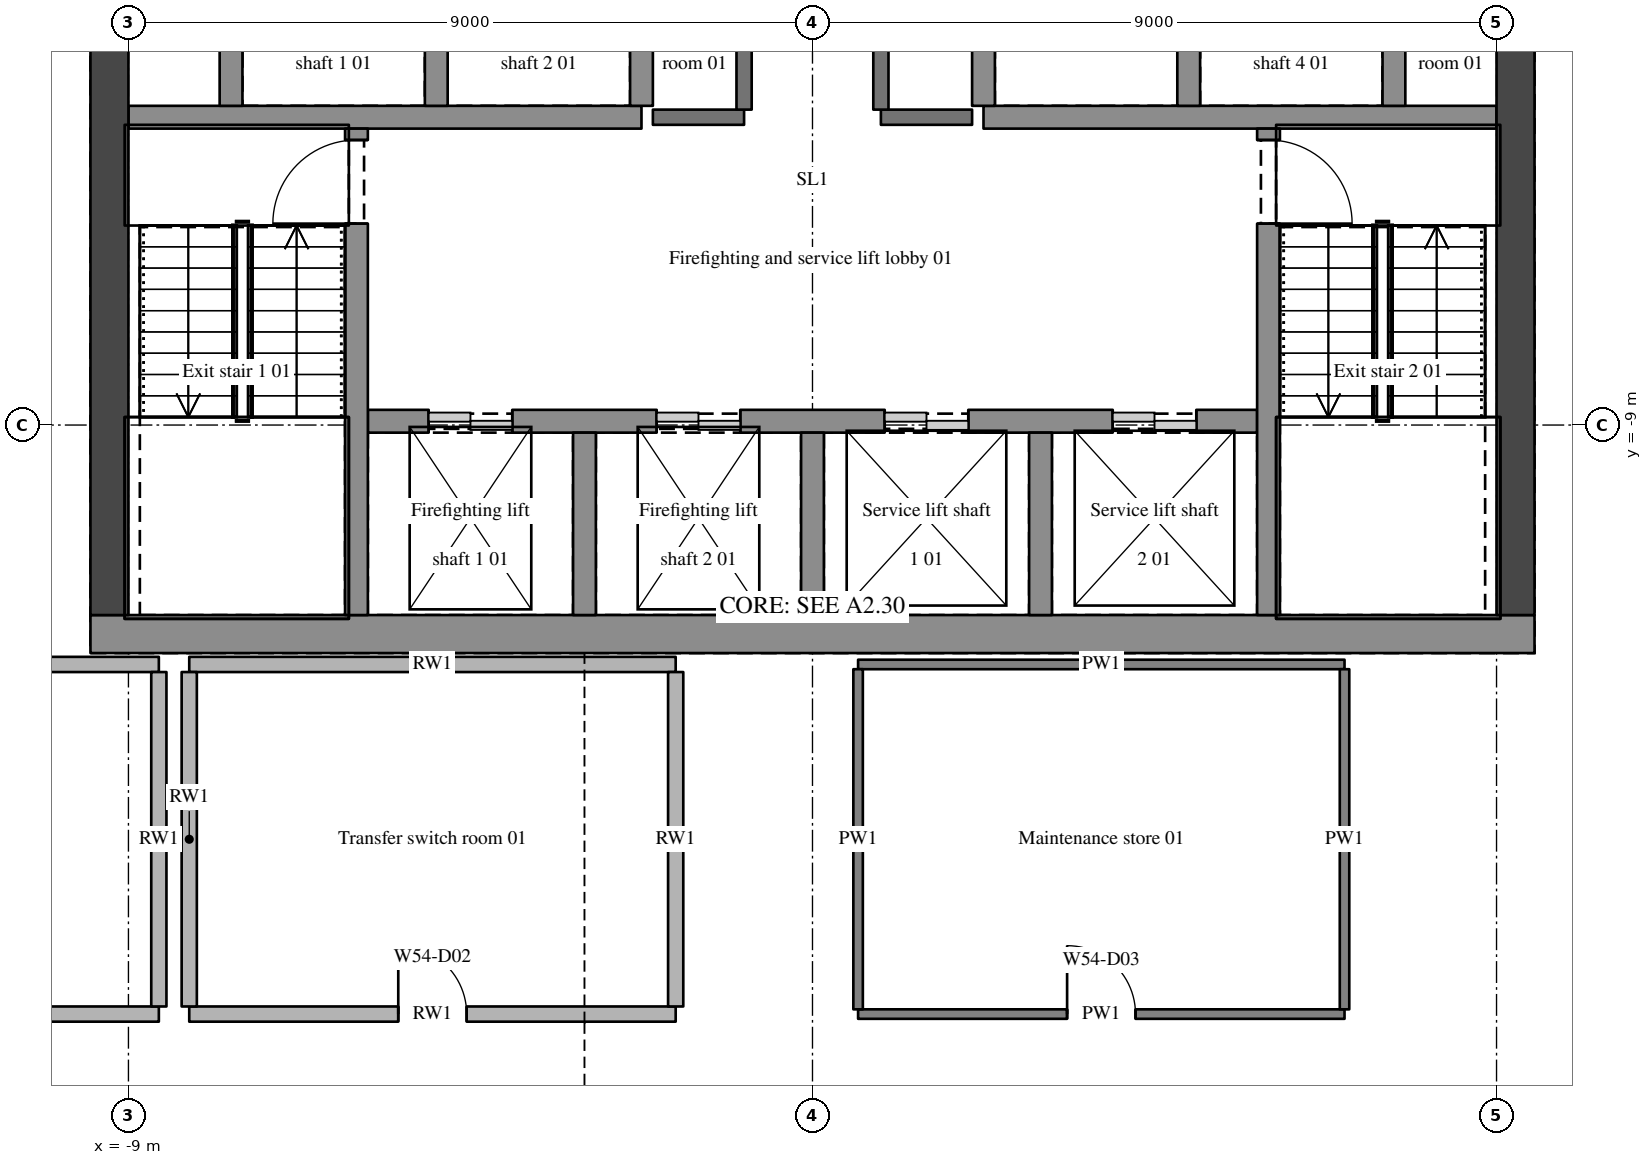
"""IFC4 building model, lengths in metres.
Left out: names, types, materials, properties, quantities, classifications, styles, units other than length and angle.
Written with IfcOpenShell. Run it as: python <this file> out.ifc"""

import sys

from ifc_helpers import new_model, si_unit, direction, frame, frame_2d, origin, place, context, subcontext, project, spatial, rectangle, extrude, element, fill, save


model = new_model("IFC4")
c1 = context("Model", 3, precision=1e-05, world=origin(), true_north=direction((0.0, 1.0)))
c2 = subcontext(c1, "Body", "Model", "MODEL_VIEW")
j1 = project(units=[si_unit("LENGTHUNIT", "METRE"), si_unit("PLANEANGLEUNIT", "RADIAN")], contexts=[c1])
p1 = place(None, origin())
s1 = spatial("IfcSite", under=j1, at=p1, CompositionType="ELEMENT")
p2 = place(p1, origin())
s2 = spatial("IfcBuilding", under=s1, at=p2, CompositionType="ELEMENT")
p3 = place(p2, frame((0.0, 0.0, 210.0)))
s3 = spatial("IfcBuildingStorey", under=s2, at=p3, CompositionType="ELEMENT", Elevation=210.0)
p4 = place(p3, frame((-9.5, -11.75, 0.0), z_axis=(0.0, 0.0, 1.0), x_axis=(1.0, 0.0, 0.0)))
e1 = element("IfcWall", 1, at=p4, inside=s3, PredefinedType="SHEAR", context=c2, shape_type="SweptSolid", body=[
    extrude(rectangle(XDim=19.0, YDim=0.5, at=frame_2d((9.5, 0.0))), origin(), (0.0, 0.0, 1.0), 7.2),
])
for number, where, z_axis, x_axis in (
    (2, (-9.25, -11.5, 0.0), (0.0, 0.0, 1.0), (0.0, 1.0, 0.0)),
    (3, (9.25, -11.5, 0.0), (0.0, 0.0, 1.0), (0.0, 1.0, 0.0)),
):
    element("IfcWall", number, at=place(p3, frame(where, z_axis=z_axis, x_axis=x_axis)), inside=s3, PredefinedType="SHEAR", context=c2, shape_type="SweptSolid", body=[
        extrude(rectangle(XDim=11.65, YDim=0.5, at=frame_2d((5.825, 0.0))), origin(), (0.0, 0.0, 1.0), 7.2),
    ])
p5 = place(p3, frame((-15.0, -16.75, 0.0), z_axis=(0.0, 0.0, 1.0), x_axis=(1.0, 0.0, 0.0)))
e4 = element("IfcWall", 4, at=p5, inside=s3, PredefinedType="SOLIDWALL", context=c2, shape_type="SweptSolid", body=[
    extrude(rectangle(XDim=6.4, YDim=0.2, at=frame_2d((3.2, 0.0))), origin(), (0.0, 0.0, 1.0), 5.5),
])
p6 = place(p5, frame((2.75, 0.0, 0.0)))
e5 = element("IfcOpeningElement", 5, at=p6, cuts=e4, PredefinedType="OPENING", context=c2, shape_type="SweptSolid", body=[
    extrude(rectangle(XDim=0.9, YDim=2.1, at=frame_2d((0.45, 1.05))), frame((0.0, 0.11, 0.0), z_axis=(0.0, -1.0, 0.0), x_axis=(1.0, 0.0, 0.0)), (0.0, 0.0, 1.0), 0.22),
])
p7 = place(p3, frame((-8.2, -16.75, 0.0), z_axis=(0.0, 0.0, 1.0), x_axis=(1.0, 0.0, 0.0)))
e6 = element("IfcWall", 6, at=p7, inside=s3, PredefinedType="SOLIDWALL", context=c2, shape_type="SweptSolid", body=[
    extrude(rectangle(XDim=6.4, YDim=0.2, at=frame_2d((3.2, 0.0))), origin(), (0.0, 0.0, 1.0), 5.5),
])
p8 = place(p7, frame((2.75, 0.0, 0.0)))
e7 = element("IfcOpeningElement", 7, at=p8, cuts=e6, PredefinedType="OPENING", context=c2, shape_type="SweptSolid", body=[
    extrude(rectangle(XDim=0.9, YDim=2.1, at=frame_2d((0.45, 1.05))), frame((0.0, 0.11, 0.0), z_axis=(0.0, -1.0, 0.0), x_axis=(1.0, 0.0, 0.0)), (0.0, 0.0, 1.0), 0.22),
])
p9 = place(p3, frame((0.6, -16.75, 0.0), z_axis=(0.0, 0.0, 1.0), x_axis=(1.0, 0.0, 0.0)))
e8 = element("IfcWall", 8, at=p9, inside=s3, PredefinedType="PARTITIONING", context=c2, shape_type="SweptSolid", body=[
    extrude(rectangle(XDim=6.4, YDim=0.125, at=frame_2d((3.2, 0.0))), origin(), (0.0, 0.0, 1.0), 5.5),
])
p10 = place(p9, frame((2.75, 0.0, 0.0)))
e9 = element("IfcOpeningElement", 9, at=p10, cuts=e8, PredefinedType="OPENING", context=c2, shape_type="SweptSolid", body=[
    extrude(rectangle(XDim=0.9, YDim=2.1, at=frame_2d((0.45, 1.05))), frame((0.0, 0.073, 0.0), z_axis=(0.0, -1.0, 0.0), x_axis=(1.0, 0.0, 0.0)), (0.0, 0.0, 1.0), 0.145),
])
for number, where, z_axis, x_axis in (
    (10, (-15.0, -12.15, 0.0), (0.0, 0.0, 1.0), (1.0, 0.0, 0.0)),
    (11, (-8.2, -12.15, 0.0), (0.0, 0.0, 1.0), (1.0, 0.0, 0.0)),
):
    element("IfcWall", number, at=place(p3, frame(where, z_axis=z_axis, x_axis=x_axis)), inside=s3, PredefinedType="SOLIDWALL", context=c2, shape_type="SweptSolid", body=[
        extrude(rectangle(XDim=6.4, YDim=0.2, at=frame_2d((3.2, 0.0))), origin(), (0.0, 0.0, 1.0), 5.5),
    ])
p11 = place(p3, frame((0.6, -12.15, 0.0), z_axis=(0.0, 0.0, 1.0), x_axis=(1.0, 0.0, 0.0)))
e12 = element("IfcWall", 12, at=p11, inside=s3, PredefinedType="PARTITIONING", context=c2, shape_type="SweptSolid", body=[
    extrude(rectangle(XDim=6.4, YDim=0.125, at=frame_2d((3.2, 0.0))), origin(), (0.0, 0.0, 1.0), 5.5),
])
p12 = place(p3, frame((-5.85, -8.95, 0.0), z_axis=(0.0, 0.0, 1.0), x_axis=(1.0, 0.0, 0.0)))
e13 = element("IfcWall", 13, at=p12, inside=s3, PredefinedType="SHEAR", context=c2, shape_type="SweptSolid", body=[
    extrude(rectangle(XDim=11.7, YDim=0.3, at=frame_2d((5.85, 0.0))), origin(), (0.0, 0.0, 1.0), 7.2),
])
p13 = place(p12, frame((0.8, 0.0, 0.0)))
e14 = element("IfcOpeningElement", 14, at=p13, cuts=e13, PredefinedType="OPENING", context=c2, shape_type="SweptSolid", body=[
    extrude(rectangle(XDim=1.1, YDim=2.1, at=frame_2d((0.55, 1.05))), frame((0.0, 0.16, 0.0), z_axis=(0.0, -1.0, 0.0), x_axis=(1.0, 0.0, 0.0)), (0.0, 0.0, 1.0), 0.32),
])
p14 = place(p12, frame((3.8, 0.0, 0.0)))
e15 = element("IfcOpeningElement", 15, at=p14, cuts=e13, PredefinedType="OPENING", context=c2, shape_type="SweptSolid", body=[
    extrude(rectangle(XDim=1.1, YDim=2.1, at=frame_2d((0.55, 1.05))), frame((0.0, 0.16, 0.0), z_axis=(0.0, -1.0, 0.0), x_axis=(1.0, 0.0, 0.0)), (0.0, 0.0, 1.0), 0.32),
])
p15 = place(p12, frame((6.8, 0.0, 0.0)))
e16 = element("IfcOpeningElement", 16, at=p15, cuts=e13, PredefinedType="OPENING", context=c2, shape_type="SweptSolid", body=[
    extrude(rectangle(XDim=1.1, YDim=2.1, at=frame_2d((0.55, 1.05))), frame((0.0, 0.16, 0.0), z_axis=(0.0, -1.0, 0.0), x_axis=(1.0, 0.0, 0.0)), (0.0, 0.0, 1.0), 0.32),
])
p16 = place(p12, frame((9.8, 0.0, 0.0)))
e17 = element("IfcOpeningElement", 17, at=p16, cuts=e13, PredefinedType="OPENING", context=c2, shape_type="SweptSolid", body=[
    extrude(rectangle(XDim=1.1, YDim=2.1, at=frame_2d((0.55, 1.05))), frame((0.0, 0.16, 0.0), z_axis=(0.0, -1.0, 0.0), x_axis=(1.0, 0.0, 0.0)), (0.0, 0.0, 1.0), 0.32),
])
p17 = place(p3, frame((-9.0, -4.95, 0.0), z_axis=(0.0, 0.0, 1.0), x_axis=(1.0, 0.0, 0.0)))
e18 = element("IfcWall", 18, at=p17, inside=s3, PredefinedType="SHEAR", context=c2, shape_type="SweptSolid", body=[
    extrude(rectangle(XDim=6.75, YDim=0.3, at=frame_2d((3.375, 0.0))), origin(), (0.0, 0.0, 1.0), 7.2),
])
for number, where, z_axis, x_axis in (
    (19, (-2.1, -4.95, 0.0), (0.0, 0.0, 1.0), (1.0, 0.0, 0.0)),
    (20, (0.9, -4.95, 0.0), (0.0, 0.0, 1.0), (1.0, 0.0, 0.0)),
):
    element("IfcWall", number, at=place(p3, frame(where, z_axis=z_axis, x_axis=x_axis)), inside=s3, PredefinedType="SOLIDWALL", context=c2, shape_type="SweptSolid", body=[
        extrude(rectangle(XDim=1.2, YDim=0.2, at=frame_2d((0.6, 0.0))), origin(), (0.0, 0.0, 1.0), 6.9),
    ])
p18 = place(p3, frame((2.25, -4.95, 0.0), z_axis=(0.0, 0.0, 1.0), x_axis=(1.0, 0.0, 0.0)))
e21 = element("IfcWall", 21, at=p18, inside=s3, PredefinedType="SHEAR", context=c2, shape_type="SweptSolid", body=[
    extrude(rectangle(XDim=6.75, YDim=0.3, at=frame_2d((3.375, 0.0))), origin(), (0.0, 0.0, 1.0), 7.2),
])
for number, where, z_axis, x_axis in (
    (22, (-8.6, -16.65, 0.0), (0.0, 0.0, 1.0), (0.0, 1.0, 0.0)),
    (23, (-8.2, -16.65, 0.0), (0.0, 0.0, 1.0), (0.0, 1.0, 0.0)),
):
    element("IfcWall", number, at=place(p3, frame(where, z_axis=z_axis, x_axis=x_axis)), inside=s3, PredefinedType="SOLIDWALL", context=c2, shape_type="SweptSolid", body=[
        extrude(rectangle(XDim=4.4, YDim=0.2, at=frame_2d((2.2, 0.0))), origin(), (0.0, 0.0, 1.0), 5.5),
    ])
p19 = place(p3, frame((-7.65, -4.8, 0.0), z_axis=(0.0, 0.0, 1.0), x_axis=(0.0, 1.0, 0.0)))
e24 = element("IfcWall", 24, at=p19, inside=s3, PredefinedType="SHEAR", context=c2, shape_type="SweptSolid", body=[
    extrude(rectangle(XDim=2.05, YDim=0.3, at=frame_2d((1.025, 0.0))), origin(), (0.0, 0.0, 1.0), 7.2),
])
p20 = place(p3, frame((-6.0, -11.5, 0.0), z_axis=(0.0, 0.0, 1.0), x_axis=(0.0, 1.0, 0.0)))
e25 = element("IfcWall", 25, at=p20, inside=s3, PredefinedType="SHEAR", context=c2, shape_type="SweptSolid", body=[
    extrude(rectangle(XDim=6.4, YDim=0.3, at=frame_2d((3.2, 0.0))), origin(), (0.0, 0.0, 1.0), 7.2),
])
p21 = place(p20, frame((5.15, 0.0, 0.0)))
e26 = element("IfcOpeningElement", 26, at=p21, cuts=e25, PredefinedType="OPENING", context=c2, shape_type="SweptSolid", body=[
    extrude(rectangle(XDim=1.1, YDim=2.1, at=frame_2d((0.55, 1.05))), frame((0.0, 0.16, 0.0), z_axis=(0.0, -1.0, 0.0), x_axis=(1.0, 0.0, 0.0)), (0.0, 0.0, 1.0), 0.32),
])
p22 = place(p3, frame((-4.95, -4.8, 0.0), z_axis=(0.0, 0.0, 1.0), x_axis=(0.0, 1.0, 0.0)))
e27 = element("IfcWall", 27, at=p22, inside=s3, PredefinedType="SHEAR", context=c2, shape_type="SweptSolid", body=[
    extrude(rectangle(XDim=2.05, YDim=0.3, at=frame_2d((1.025, 0.0))), origin(), (0.0, 0.0, 1.0), 7.2),
])
p23 = place(p3, frame((-3.0, -11.5, 0.0), z_axis=(0.0, 0.0, 1.0), x_axis=(0.0, 1.0, 0.0)))
e28 = element("IfcWall", 28, at=p23, inside=s3, PredefinedType="SHEAR", context=c2, shape_type="SweptSolid", body=[
    extrude(rectangle(XDim=2.4, YDim=0.3, at=frame_2d((1.2, 0.0))), origin(), (0.0, 0.0, 1.0), 7.2),
])
p24 = place(p3, frame((-2.25, -4.8, 0.0), z_axis=(0.0, 0.0, 1.0), x_axis=(0.0, 1.0, 0.0)))
e29 = element("IfcWall", 29, at=p24, inside=s3, PredefinedType="SHEAR", context=c2, shape_type="SweptSolid", body=[
    extrude(rectangle(XDim=2.05, YDim=0.3, at=frame_2d((1.025, 0.0))), origin(), (0.0, 0.0, 1.0), 7.2),
])
p25 = place(p3, frame((-1.8, -16.65, 0.0), z_axis=(0.0, 0.0, 1.0), x_axis=(0.0, 1.0, 0.0)))
e30 = element("IfcWall", 30, at=p25, inside=s3, PredefinedType="SOLIDWALL", context=c2, shape_type="SweptSolid", body=[
    extrude(rectangle(XDim=4.4, YDim=0.2, at=frame_2d((2.2, 0.0))), origin(), (0.0, 0.0, 1.0), 5.5),
])
p26 = place(p3, frame((-0.9, -4.85, 0.0), z_axis=(0.0, 0.0, 1.0), x_axis=(0.0, 1.0, 0.0)))
e31 = element("IfcWall", 31, at=p26, inside=s3, PredefinedType="SOLIDWALL", context=c2, shape_type="SweptSolid", body=[
    extrude(rectangle(XDim=2.15, YDim=0.2, at=frame_2d((1.075, 0.0))), origin(), (0.0, 0.0, 1.0), 6.9),
])
p27 = place(p3, frame((0.0, -11.5, 0.0), z_axis=(0.0, 0.0, 1.0), x_axis=(0.0, 1.0, 0.0)))
e32 = element("IfcWall", 32, at=p27, inside=s3, PredefinedType="SHEAR", context=c2, shape_type="SweptSolid", body=[
    extrude(rectangle(XDim=2.4, YDim=0.3, at=frame_2d((1.2, 0.0))), origin(), (0.0, 0.0, 1.0), 7.2),
])
p28 = place(p3, frame((0.6, -16.688, 0.0), z_axis=(0.0, 0.0, 1.0), x_axis=(0.0, 1.0, 0.0)))
e33 = element("IfcWall", 33, at=p28, inside=s3, PredefinedType="PARTITIONING", context=c2, shape_type="SweptSolid", body=[
    extrude(rectangle(XDim=4.475, YDim=0.125, at=frame_2d((2.238, 0.0))), origin(), (0.0, 0.0, 1.0), 5.5),
])
p29 = place(p3, frame((0.9, -4.85, 0.0), z_axis=(0.0, 0.0, 1.0), x_axis=(0.0, 1.0, 0.0)))
e34 = element("IfcWall", 34, at=p29, inside=s3, PredefinedType="SOLIDWALL", context=c2, shape_type="SweptSolid", body=[
    extrude(rectangle(XDim=2.15, YDim=0.2, at=frame_2d((1.075, 0.0))), origin(), (0.0, 0.0, 1.0), 6.9),
])
p30 = place(p3, frame((2.25, -4.8, 0.0), z_axis=(0.0, 0.0, 1.0), x_axis=(0.0, 1.0, 0.0)))
e35 = element("IfcWall", 35, at=p30, inside=s3, PredefinedType="SHEAR", context=c2, shape_type="SweptSolid", body=[
    extrude(rectangle(XDim=2.05, YDim=0.3, at=frame_2d((1.025, 0.0))), origin(), (0.0, 0.0, 1.0), 7.2),
])
p31 = place(p3, frame((3.0, -11.5, 0.0), z_axis=(0.0, 0.0, 1.0), x_axis=(0.0, 1.0, 0.0)))
e36 = element("IfcWall", 36, at=p31, inside=s3, PredefinedType="SHEAR", context=c2, shape_type="SweptSolid", body=[
    extrude(rectangle(XDim=2.4, YDim=0.3, at=frame_2d((1.2, 0.0))), origin(), (0.0, 0.0, 1.0), 7.2),
])
p32 = place(p3, frame((4.95, -4.8, 0.0), z_axis=(0.0, 0.0, 1.0), x_axis=(0.0, 1.0, 0.0)))
e37 = element("IfcWall", 37, at=p32, inside=s3, PredefinedType="SHEAR", context=c2, shape_type="SweptSolid", body=[
    extrude(rectangle(XDim=2.05, YDim=0.3, at=frame_2d((1.025, 0.0))), origin(), (0.0, 0.0, 1.0), 7.2),
])
p33 = place(p3, frame((6.0, -5.1, 0.0), z_axis=(0.0, 0.0, 1.0), x_axis=(0.0, -1.0, 0.0)))
e38 = element("IfcWall", 38, at=p33, inside=s3, PredefinedType="SHEAR", context=c2, shape_type="SweptSolid", body=[
    extrude(rectangle(XDim=6.4, YDim=0.3, at=frame_2d((3.2, 0.0))), origin(), (0.0, 0.0, 1.0), 7.2),
])
p34 = place(p33, frame((0.15, 0.0, 0.0)))
e39 = element("IfcOpeningElement", 39, at=p34, cuts=e38, PredefinedType="OPENING", context=c2, shape_type="SweptSolid", body=[
    extrude(rectangle(XDim=1.1, YDim=2.1, at=frame_2d((0.55, 1.05))), frame((0.0, 0.16, 0.0), z_axis=(0.0, -1.0, 0.0), x_axis=(1.0, 0.0, 0.0)), (0.0, 0.0, 1.0), 0.32),
])
p35 = place(p3, frame((7.0, -16.688, 0.0), z_axis=(0.0, 0.0, 1.0), x_axis=(0.0, 1.0, 0.0)))
e40 = element("IfcWall", 40, at=p35, inside=s3, PredefinedType="PARTITIONING", context=c2, shape_type="SweptSolid", body=[
    extrude(rectangle(XDim=4.475, YDim=0.125, at=frame_2d((2.238, 0.0))), origin(), (0.0, 0.0, 1.0), 5.5),
])
p36 = place(p3, frame((7.65, -4.8, 0.0), z_axis=(0.0, 0.0, 1.0), x_axis=(0.0, 1.0, 0.0)))
e41 = element("IfcWall", 41, at=p36, inside=s3, PredefinedType="SHEAR", context=c2, shape_type="SweptSolid", body=[
    extrude(rectangle(XDim=2.05, YDim=0.3, at=frame_2d((1.025, 0.0))), origin(), (0.0, 0.0, 1.0), 7.2),
])
p37 = place(p21, origin())
e42 = element("IfcDoor", 42, at=p37, inside=s3, OperationType="SINGLE_SWING_LEFT", PredefinedType="DOOR", context=c2, shape_type="SweptSolid", body=[
    extrude(rectangle(XDim=1.1, YDim=2.1, at=frame_2d((0.55, 1.05))), frame((0.0, 0.025, 0.0), z_axis=(0.0, -1.0, 0.0), x_axis=(1.0, 0.0, 0.0)), (0.0, 0.0, 1.0), 0.05),
])
fill(e26, e42)
p38 = place(p34, origin())
e43 = element("IfcDoor", 43, at=p38, inside=s3, OperationType="SINGLE_SWING_RIGHT", PredefinedType="DOOR", context=c2, shape_type="SweptSolid", body=[
    extrude(rectangle(XDim=1.1, YDim=2.1, at=frame_2d((0.55, 1.05))), frame((0.0, 0.025, 0.0), z_axis=(0.0, -1.0, 0.0), x_axis=(1.0, 0.0, 0.0)), (0.0, 0.0, 1.0), 0.05),
])
fill(e39, e43)
p39 = place(p10, origin())
e44 = element("IfcDoor", 44, at=p39, inside=s3, OperationType="SINGLE_SWING_LEFT", PredefinedType="DOOR", context=c2, shape_type="SweptSolid", body=[
    extrude(rectangle(XDim=0.9, YDim=2.1, at=frame_2d((0.45, 1.05))), frame((0.0, 0.025, 0.0), z_axis=(0.0, -1.0, 0.0), x_axis=(1.0, 0.0, 0.0)), (0.0, 0.0, 1.0), 0.05),
])
fill(e9, e44)
p40 = place(p8, origin())
e45 = element("IfcDoor", 45, at=p40, inside=s3, OperationType="SINGLE_SWING_LEFT", PredefinedType="DOOR", context=c2, shape_type="SweptSolid", body=[
    extrude(rectangle(XDim=0.9, YDim=2.1, at=frame_2d((0.45, 1.05))), frame((0.0, 0.025, 0.0), z_axis=(0.0, -1.0, 0.0), x_axis=(1.0, 0.0, 0.0)), (0.0, 0.0, 1.0), 0.05),
])
fill(e7, e45)
p41 = place(p13, origin())
e46 = element("IfcDoor", 46, at=p41, inside=s3, OperationType="DOUBLE_DOOR_SLIDING", PredefinedType="DOOR", context=c2, shape_type="SweptSolid", body=[
    extrude(rectangle(XDim=1.1, YDim=2.1, at=frame_2d((0.55, 1.05))), frame((0.0, 0.025, 0.0), z_axis=(0.0, -1.0, 0.0), x_axis=(1.0, 0.0, 0.0)), (0.0, 0.0, 1.0), 0.05),
])
fill(e14, e46)
p42 = place(p14, origin())
e47 = element("IfcDoor", 47, at=p42, inside=s3, OperationType="DOUBLE_DOOR_SLIDING", PredefinedType="DOOR", context=c2, shape_type="SweptSolid", body=[
    extrude(rectangle(XDim=1.1, YDim=2.1, at=frame_2d((0.55, 1.05))), frame((0.0, 0.025, 0.0), z_axis=(0.0, -1.0, 0.0), x_axis=(1.0, 0.0, 0.0)), (0.0, 0.0, 1.0), 0.05),
])
fill(e15, e47)
p43 = place(p15, origin())
e48 = element("IfcDoor", 48, at=p43, inside=s3, OperationType="DOUBLE_DOOR_SLIDING", PredefinedType="DOOR", context=c2, shape_type="SweptSolid", body=[
    extrude(rectangle(XDim=1.1, YDim=2.1, at=frame_2d((0.55, 1.05))), frame((0.0, 0.025, 0.0), z_axis=(0.0, -1.0, 0.0), x_axis=(1.0, 0.0, 0.0)), (0.0, 0.0, 1.0), 0.05),
])
fill(e16, e48)
p44 = place(p16, origin())
e49 = element("IfcDoor", 49, at=p44, inside=s3, OperationType="DOUBLE_DOOR_SLIDING", PredefinedType="DOOR", context=c2, shape_type="SweptSolid", body=[
    extrude(rectangle(XDim=1.1, YDim=2.1, at=frame_2d((0.55, 1.05))), frame((0.0, 0.025, 0.0), z_axis=(0.0, -1.0, 0.0), x_axis=(1.0, 0.0, 0.0)), (0.0, 0.0, 1.0), 0.05),
])
fill(e17, e49)
save(model, sys.argv[1])
